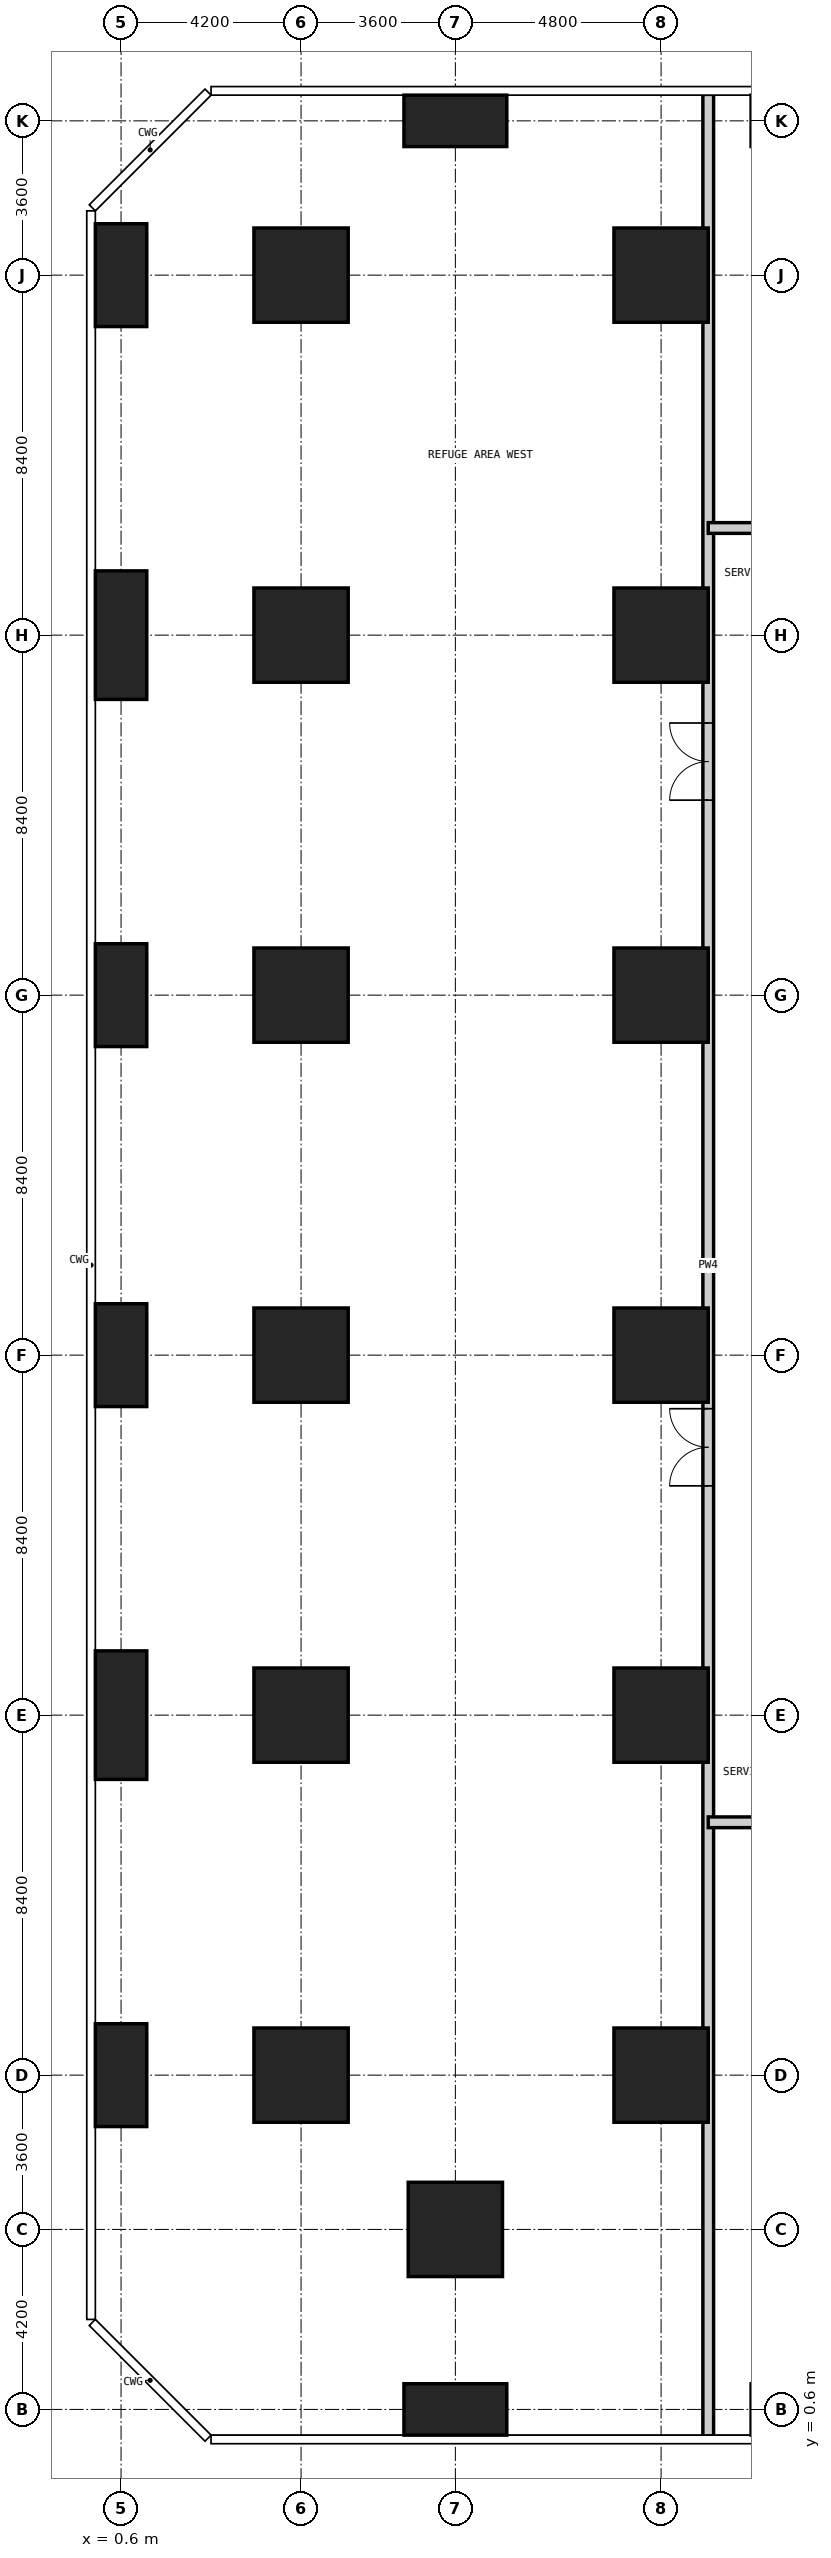
"""IFC4 building model, lengths in metres.
Left out: names, types, materials, properties, quantities, classifications, styles, units other than length and angle.
Written with IfcOpenShell. Run it as: python <this file> out.ifc"""

import sys

from ifc_helpers import new_model, si_unit, direction, frame, frame_2d, origin, origin_2d, place, context, subcontext, project, spatial, rectangle, extrude, element, fill, save


model = new_model("IFC4")
c1 = context("Model", 3, precision=1e-05, world=origin(), true_north=direction((0.0, 1.0)))
c2 = subcontext(c1, "Body", "Model", "MODEL_VIEW")
j1 = project(units=[si_unit("LENGTHUNIT", "METRE"), si_unit("PLANEANGLEUNIT", "RADIAN")], contexts=[c1])
p1 = place(None, origin())
s1 = spatial("IfcSite", under=j1, at=p1, CompositionType="ELEMENT")
p2 = place(p1, origin())
s2 = spatial("IfcBuilding", under=s1, at=p2, CompositionType="ELEMENT")
p3 = place(p2, frame((0.0, 0.0, 153.6)))
s3 = spatial("IfcBuildingStorey", under=s2, at=p3, CompositionType="ELEMENT", Elevation=153.6)
p4 = place(p3, frame((0.6, 8.4, -0.4), z_axis=(0.0, 0.0, 1.0), x_axis=(1.0, 0.0, 0.0)))
e1 = element("IfcColumn", 1, at=p4, inside=s3, PredefinedType="COLUMN", context=c2, shape_type="SweptSolid", body=[
    extrude(rectangle(XDim=1.2, YDim=2.4, at=origin_2d()), origin(), (0.0, 0.0, 1.0), 5.45),
])
p5 = place(p3, frame((0.6, 16.8, -0.4), z_axis=(0.0, 0.0, 1.0), x_axis=(1.0, 0.0, 0.0)))
e2 = element("IfcColumn", 2, at=p5, inside=s3, PredefinedType="COLUMN", context=c2, shape_type="SweptSolid", body=[
    extrude(rectangle(XDim=1.2, YDim=3.0, at=origin_2d()), origin(), (0.0, 0.0, 1.0), 5.45),
])
for number, where, z_axis, x_axis in (
    (3, (0.6, 25.2, -0.4), (0.0, 0.0, 1.0), (1.0, 0.0, 0.0)),
    (4, (0.6, 33.6, -0.4), (0.0, 0.0, 1.0), (1.0, 0.0, 0.0)),
):
    element("IfcColumn", number, at=place(p3, frame(where, z_axis=z_axis, x_axis=x_axis)), inside=s3, PredefinedType="COLUMN", context=c2, shape_type="SweptSolid", body=[
        extrude(rectangle(XDim=1.2, YDim=2.4, at=origin_2d()), origin(), (0.0, 0.0, 1.0), 5.45),
    ])
p6 = place(p3, frame((0.6, 42.0, -0.4), z_axis=(0.0, 0.0, 1.0), x_axis=(1.0, 0.0, 0.0)))
e5 = element("IfcColumn", 5, at=p6, inside=s3, PredefinedType="COLUMN", context=c2, shape_type="SweptSolid", body=[
    extrude(rectangle(XDim=1.2, YDim=3.0, at=origin_2d()), origin(), (0.0, 0.0, 1.0), 5.45),
])
p7 = place(p3, frame((0.6, 50.4, -0.4), z_axis=(0.0, 0.0, 1.0), x_axis=(1.0, 0.0, 0.0)))
e6 = element("IfcColumn", 6, at=p7, inside=s3, PredefinedType="COLUMN", context=c2, shape_type="SweptSolid", body=[
    extrude(rectangle(XDim=1.2, YDim=2.4, at=origin_2d()), origin(), (0.0, 0.0, 1.0), 5.45),
])
for number, where, z_axis, x_axis in (
    (7, (4.8, 8.4, -0.4), (0.0, 0.0, 1.0), (1.0, 0.0, 0.0)),
    (8, (4.8, 16.8, -0.4), (0.0, 0.0, 1.0), (1.0, 0.0, 0.0)),
    (9, (4.8, 25.2, -0.4), (0.0, 0.0, 1.0), (1.0, 0.0, 0.0)),
    (10, (4.8, 33.6, -0.4), (0.0, 0.0, 1.0), (1.0, 0.0, 0.0)),
    (11, (4.8, 42.0, -0.4), (0.0, 0.0, 1.0), (1.0, 0.0, 0.0)),
    (12, (4.8, 50.4, -0.4), (0.0, 0.0, 1.0), (1.0, 0.0, 0.0)),
):
    element("IfcColumn", number, at=place(p3, frame(where, z_axis=z_axis, x_axis=x_axis)), inside=s3, PredefinedType="COLUMN", context=c2, shape_type="SweptSolid", body=[
        extrude(rectangle(XDim=2.2, YDim=2.2, at=origin_2d()), origin(), (0.0, 0.0, 1.0), 5.45),
    ])
p8 = place(p3, frame((8.4, 0.6, -0.4), z_axis=(0.0, 0.0, 1.0), x_axis=(1.0, 0.0, 0.0)))
e13 = element("IfcColumn", 13, at=p8, inside=s3, PredefinedType="COLUMN", context=c2, shape_type="SweptSolid", body=[
    extrude(rectangle(XDim=2.4, YDim=1.2, at=origin_2d()), origin(), (0.0, 0.0, 1.0), 5.45),
])
p9 = place(p3, frame((8.4, 4.8, -0.4), z_axis=(0.0, 0.0, 1.0), x_axis=(1.0, 0.0, 0.0)))
e14 = element("IfcColumn", 14, at=p9, inside=s3, PredefinedType="COLUMN", context=c2, shape_type="SweptSolid", body=[
    extrude(rectangle(XDim=2.2, YDim=2.2, at=origin_2d()), origin(), (0.0, 0.0, 1.0), 5.45),
])
p10 = place(p3, frame((8.4, 54.0, -0.4), z_axis=(0.0, 0.0, 1.0), x_axis=(1.0, 0.0, 0.0)))
e15 = element("IfcColumn", 15, at=p10, inside=s3, PredefinedType="COLUMN", context=c2, shape_type="SweptSolid", body=[
    extrude(rectangle(XDim=2.4, YDim=1.2, at=origin_2d()), origin(), (0.0, 0.0, 1.0), 5.45),
])
for number, where, z_axis, x_axis in (
    (16, (13.2, 8.4, -0.4), (0.0, 0.0, 1.0), (1.0, 0.0, 0.0)),
    (17, (13.2, 16.8, -0.4), (0.0, 0.0, 1.0), (1.0, 0.0, 0.0)),
    (18, (13.2, 25.2, -0.4), (0.0, 0.0, 1.0), (1.0, 0.0, 0.0)),
    (19, (13.2, 33.6, -0.4), (0.0, 0.0, 1.0), (1.0, 0.0, 0.0)),
    (20, (13.2, 42.0, -0.4), (0.0, 0.0, 1.0), (1.0, 0.0, 0.0)),
    (21, (13.2, 50.4, -0.4), (0.0, 0.0, 1.0), (1.0, 0.0, 0.0)),
):
    element("IfcColumn", number, at=place(p3, frame(where, z_axis=z_axis, x_axis=x_axis)), inside=s3, PredefinedType="COLUMN", context=c2, shape_type="SweptSolid", body=[
        extrude(rectangle(XDim=2.2, YDim=2.2, at=origin_2d()), origin(), (0.0, 0.0, 1.0), 5.45),
    ])
p11 = place(p3, frame((14.3, -0.018, 0.0), z_axis=(0.0, 0.0, 1.0), x_axis=(0.0, 1.0, 0.0)))
e22 = element("IfcWall", 22, at=p11, inside=s3, PredefinedType="PARTITIONING", context=c2, shape_type="SweptSolid", body=[
    extrude(rectangle(XDim=54.636, YDim=0.25, at=frame_2d((27.318, 0.0))), origin(), (0.0, 0.0, 1.0), 5.05),
])
p12 = place(p11, frame((22.168, 0.0, 0.0)))
e23 = element("IfcOpeningElement", 23, at=p12, cuts=e22, PredefinedType="OPENING", context=c2, shape_type="SweptSolid", body=[
    extrude(rectangle(XDim=1.8, YDim=2.4, at=frame_2d((0.9, 1.2))), frame((0.0, 0.135, 0.0), z_axis=(0.0, -1.0, 0.0), x_axis=(1.0, 0.0, 0.0)), (0.0, 0.0, 1.0), 0.27),
])
p13 = place(p11, frame((38.168, 0.0, 0.0)))
e24 = element("IfcOpeningElement", 24, at=p13, cuts=e22, PredefinedType="OPENING", context=c2, shape_type="SweptSolid", body=[
    extrude(rectangle(XDim=1.8, YDim=2.4, at=frame_2d((0.9, 1.2))), frame((0.0, 0.135, 0.0), z_axis=(0.0, -1.0, 0.0), x_axis=(1.0, 0.0, 0.0)), (0.0, 0.0, 1.0), 0.27),
])
p14 = place(p3, frame((14.3, 14.3, 0.0), z_axis=(0.0, 0.0, 1.0), x_axis=(1.0, 0.0, 0.0)))
e25 = element("IfcWall", 25, at=p14, inside=s3, PredefinedType="PARTITIONING", context=c2, shape_type="SweptSolid", body=[
    extrude(rectangle(XDim=30.2, YDim=0.25, at=frame_2d((15.1, 0.0))), origin(), (0.0, 0.0, 1.0), 5.05),
])
p15 = place(p14, frame((19.65, 0.0, 0.0)))
e26 = element("IfcOpeningElement", 26, at=p15, cuts=e25, PredefinedType="OPENING", context=c2, shape_type="SweptSolid", body=[
    extrude(rectangle(XDim=1.8, YDim=2.4, at=frame_2d((0.9, 1.2))), frame((0.0, 0.135, 0.0), z_axis=(0.0, -1.0, 0.0), x_axis=(1.0, 0.0, 0.0)), (0.0, 0.0, 1.0), 0.27),
])
p16 = place(p14, frame((4.55, 0.0, 0.0)))
e27 = element("IfcOpeningElement", 27, at=p16, cuts=e25, PredefinedType="OPENING", context=c2, shape_type="SweptSolid", body=[
    extrude(rectangle(XDim=1.8, YDim=2.4, at=frame_2d((0.9, 1.2))), frame((0.0, 0.135, 0.0), z_axis=(0.0, -1.0, 0.0), x_axis=(1.0, 0.0, 0.0)), (0.0, 0.0, 1.0), 0.27),
])
p17 = place(p3, frame((14.3, 44.5, 0.0), z_axis=(0.0, 0.0, 1.0), x_axis=(1.0, 0.0, 0.0)))
e28 = element("IfcWall", 28, at=p17, inside=s3, PredefinedType="PARTITIONING", context=c2, shape_type="SweptSolid", body=[
    extrude(rectangle(XDim=30.2, YDim=0.25, at=frame_2d((15.1, 0.0))), origin(), (0.0, 0.0, 1.0), 5.05),
])
p18 = place(p17, frame((4.55, 0.0, 0.0)))
e29 = element("IfcOpeningElement", 29, at=p18, cuts=e28, PredefinedType="OPENING", context=c2, shape_type="SweptSolid", body=[
    extrude(rectangle(XDim=1.8, YDim=2.4, at=frame_2d((0.9, 1.2))), frame((0.0, 0.135, 0.0), z_axis=(0.0, -1.0, 0.0), x_axis=(1.0, 0.0, 0.0)), (0.0, 0.0, 1.0), 0.27),
])
p19 = place(p17, frame((23.85, 0.0, 0.0)))
e30 = element("IfcOpeningElement", 30, at=p19, cuts=e28, PredefinedType="OPENING", context=c2, shape_type="SweptSolid", body=[
    extrude(rectangle(XDim=1.8, YDim=2.4, at=frame_2d((0.9, 1.2))), frame((0.0, 0.135, 0.0), z_axis=(0.0, -1.0, 0.0), x_axis=(1.0, 0.0, 0.0)), (0.0, 0.0, 1.0), 0.27),
])
p20 = place(p12, origin())
e31 = element("IfcDoor", 31, at=p20, inside=s3, OperationType="DOUBLE_DOOR_DOUBLE_SWING", PredefinedType="DOOR", context=c2, shape_type="SweptSolid", body=[
    extrude(rectangle(XDim=1.8, YDim=2.4, at=frame_2d((0.9, 1.2))), frame((0.0, 0.025, 0.0), z_axis=(0.0, -1.0, 0.0), x_axis=(1.0, 0.0, 0.0)), (0.0, 0.0, 1.0), 0.05),
])
fill(e23, e31)
p21 = place(p13, origin())
e32 = element("IfcDoor", 32, at=p21, inside=s3, OperationType="DOUBLE_DOOR_DOUBLE_SWING", PredefinedType="DOOR", context=c2, shape_type="SweptSolid", body=[
    extrude(rectangle(XDim=1.8, YDim=2.4, at=frame_2d((0.9, 1.2))), frame((0.0, 0.025, 0.0), z_axis=(0.0, -1.0, 0.0), x_axis=(1.0, 0.0, 0.0)), (0.0, 0.0, 1.0), 0.05),
])
fill(e24, e32)
save(model, sys.argv[1])
